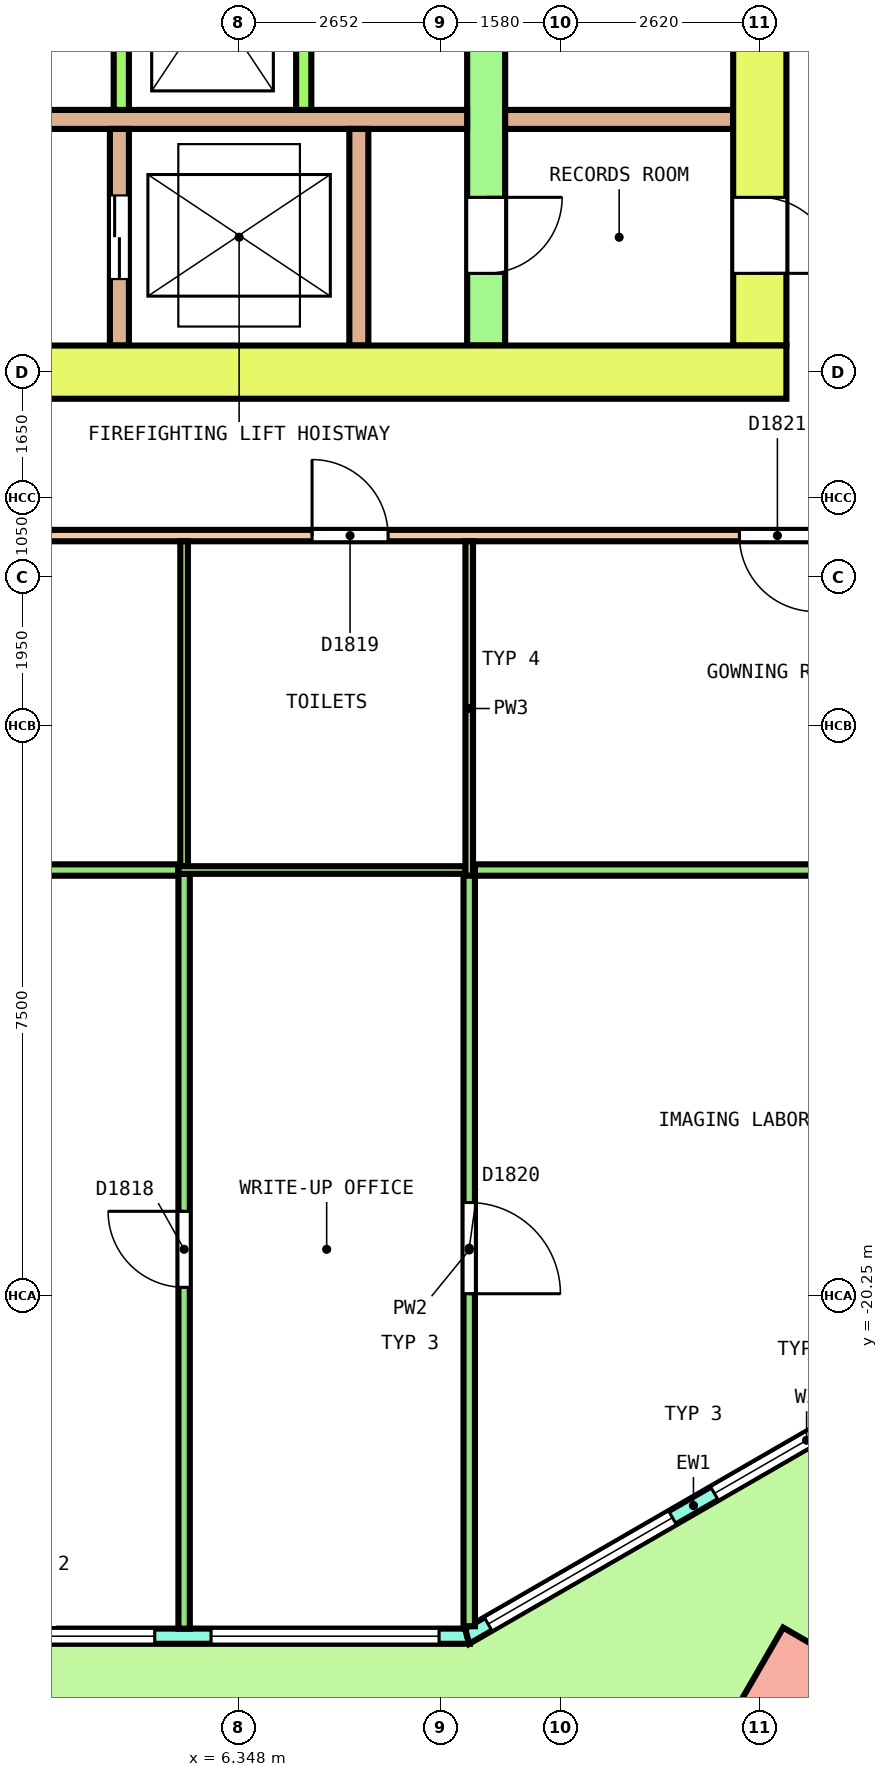
"""IFC4 building model, lengths in metres.
Left out: names, types, materials, properties, quantities, classifications, styles, units other than length and angle.
Written with IfcOpenShell. Run it as: python <this file> out.ifc"""

import sys

from ifc_helpers import new_model, si_unit, direction, frame, frame_2d, origin, origin_2d, place, context, subcontext, project, spatial, polyline, rectangle, outline, extrude, element, fill, save


model = new_model("IFC4")
c1 = context("Model", 3, precision=1e-05, world=origin(), true_north=direction((0.0, 1.0)))
c2 = subcontext(c1, "Body", "Model", "MODEL_VIEW")
j1 = project(units=[si_unit("LENGTHUNIT", "METRE"), si_unit("PLANEANGLEUNIT", "RADIAN")], contexts=[c1])
p1 = place(None, origin())
s1 = spatial("IfcSite", under=j1, at=p1, CompositionType="ELEMENT")
p2 = place(p1, origin())
s2 = spatial("IfcBuilding", under=s1, at=p2, CompositionType="ELEMENT")
p3 = place(p2, frame((0.0, 0.0, 171.6)))
s3 = spatial("IfcBuildingStorey", under=s2, at=p3, CompositionType="ELEMENT", Elevation=171.6)
p4 = place(p3, frame((13.727, -25.436, 0.0), z_axis=(-0.018133721723, -0.031387604711, 0.999342777233), x_axis=(0.86599921333, 0.499059227482, 0.031388691869)))
e1 = element("IfcColumn", 1, at=p4, inside=s3, PredefinedType="COLUMN", context=c2, shape_type="SweptSolid", body=[
    extrude(rectangle(XDim=1.2, YDim=1.2, at=origin_2d()), origin(), (0.0, 0.0, 1.0), 4.052),
])
p5 = place(p3, frame((-9.351, -24.73, 0.0), z_axis=(0.0, 0.0, 1.0), x_axis=(1.0, 0.0, 0.0)))
e2 = element("IfcWall", 2, at=p5, inside=s3, PredefinedType="SOLIDWALL", context=c2, shape_type="SweptSolid", body=[
    extrude(outline(polyline([(-0.027, -0.1), (1.015, -0.1), (2.057, -0.1), (3.099, -0.1), (4.141, -0.1), (5.183, -0.1), (6.225, -0.1), (7.267, -0.1), (8.309, -0.1), (9.351, -0.1), (10.393, -0.1), (11.435, -0.1), (12.476, -0.1), (13.518, -0.1), (14.56, -0.1), (15.602, -0.1), (16.644, -0.1), (17.686, -0.1), (18.728, -0.1), (18.674, 0.1), (17.638, 0.1), (16.602, 0.1), (15.566, 0.1), (14.531, 0.1), (13.494, 0.1), (12.458, 0.1), (11.423, 0.1), (10.386, 0.1), (9.351, 0.1), (8.315, 0.1), (7.279, 0.1), (6.243, 0.1), (5.207, 0.1), (4.171, 0.1), (3.135, 0.1), (2.099, 0.1), (1.063, 0.1), (0.027, 0.1), (-0.027, -0.1)])), origin(), (0.0, 0.0, 1.0), 4.1),
])
p6 = place(p5, frame((0.37, 0.0, 0.1)))
e3 = element("IfcOpeningElement", 3, at=p6, cuts=e2, PredefinedType="OPENING", context=c2, shape_type="SweptSolid", body=[
    extrude(rectangle(XDim=3.0, YDim=2.9, at=frame_2d((1.5, 1.45))), frame((0.0, 0.11, 0.0), z_axis=(0.0, -1.0, 0.0), x_axis=(1.0, 0.0, 0.0)), (0.0, 0.0, 1.0), 0.22),
])
p7 = place(p5, frame((4.11, 0.0, 0.1)))
e4 = element("IfcOpeningElement", 4, at=p7, cuts=e2, PredefinedType="OPENING", context=c2, shape_type="SweptSolid", body=[
    extrude(rectangle(XDim=3.0, YDim=2.9, at=frame_2d((1.5, 1.45))), frame((0.0, 0.11, 0.0), z_axis=(0.0, -1.0, 0.0), x_axis=(1.0, 0.0, 0.0)), (0.0, 0.0, 1.0), 0.22),
])
p8 = place(p5, frame((8.451, 0.0, 0.0)))
e5 = element("IfcOpeningElement", 5, at=p8, cuts=e2, PredefinedType="OPENING", context=c2, shape_type="SweptSolid", body=[
    extrude(rectangle(XDim=1.8, YDim=2.4, at=frame_2d((0.9, 1.2))), frame((0.0, 0.11, 0.0), z_axis=(0.0, -1.0, 0.0), x_axis=(1.0, 0.0, 0.0)), (0.0, 0.0, 1.0), 0.22),
])
p9 = place(p5, frame((8.451, 0.0, 2.55)))
e6 = element("IfcOpeningElement", 6, at=p9, cuts=e2, PredefinedType="OPENING", context=c2, shape_type="SweptSolid", body=[
    extrude(rectangle(XDim=1.8, YDim=0.45, at=frame_2d((0.9, 0.225))), frame((0.0, 0.11, 0.0), z_axis=(0.0, -1.0, 0.0), x_axis=(1.0, 0.0, 0.0)), (0.0, 0.0, 1.0), 0.22),
])
p10 = place(p5, frame((11.591, 0.0, 0.1)))
e7 = element("IfcOpeningElement", 7, at=p10, cuts=e2, PredefinedType="OPENING", context=c2, shape_type="SweptSolid", body=[
    extrude(rectangle(XDim=3.0, YDim=2.9, at=frame_2d((1.5, 1.45))), frame((0.0, 0.11, 0.0), z_axis=(0.0, -1.0, 0.0), x_axis=(1.0, 0.0, 0.0)), (0.0, 0.0, 1.0), 0.22),
])
p11 = place(p5, frame((15.331, 0.0, 0.1)))
e8 = element("IfcOpeningElement", 8, at=p11, cuts=e2, PredefinedType="OPENING", context=c2, shape_type="SweptSolid", body=[
    extrude(rectangle(XDim=3.0, YDim=2.9, at=frame_2d((1.5, 1.45))), frame((0.0, 0.11, 0.0), z_axis=(0.0, -1.0, 0.0), x_axis=(1.0, 0.0, 0.0)), (0.0, 0.0, 1.0), 0.22),
])
p12 = place(p3, frame((9.351, -24.73, 0.0), z_axis=(0.0, 0.0, 1.0), x_axis=(0.866014080581, 0.50001961185, 0.0)))
e9 = element("IfcWall", 9, at=p12, inside=s3, PredefinedType="SOLIDWALL", context=c2, shape_type="SweptSolid", body=[
    extrude(outline(polyline([(-0.027, -0.1), (1.128, -0.1), (2.283, -0.1), (3.438, -0.1), (4.592, -0.1), (5.747, -0.1), (6.902, -0.1), (6.848, 0.1), (5.711, 0.1), (4.574, 0.1), (3.438, 0.1), (2.301, 0.1), (1.164, 0.1), (0.027, 0.1), (-0.027, -0.1)])), origin(), (0.0, 0.0, 1.0), 4.1),
])
p13 = place(p12, frame((0.319, 0.0, 0.1)))
e10 = element("IfcOpeningElement", 10, at=p13, cuts=e9, PredefinedType="OPENING", context=c2, shape_type="SweptSolid", body=[
    extrude(rectangle(XDim=2.8, YDim=2.9, at=frame_2d((1.4, 1.45))), frame((0.0, 0.11, 0.0), z_axis=(0.0, -1.0, 0.0), x_axis=(1.0, 0.0, 0.0)), (0.0, 0.0, 1.0), 0.22),
])
p14 = place(p12, frame((3.756, 0.0, 0.1)))
e11 = element("IfcOpeningElement", 11, at=p14, cuts=e9, PredefinedType="OPENING", context=c2, shape_type="SweptSolid", body=[
    extrude(rectangle(XDim=2.8, YDim=2.9, at=frame_2d((1.4, 1.45))), frame((0.0, 0.11, 0.0), z_axis=(0.0, -1.0, 0.0), x_axis=(1.0, 0.0, 0.0)), (0.0, 0.0, 1.0), 0.22),
])
p15 = place(p3, frame((-13.55, -8.1, 0.0), z_axis=(0.0, 0.0, 1.0), x_axis=(1.0, 0.0, 0.0)))
e12 = element("IfcWall", 12, at=p15, inside=s3, PredefinedType="SHEAR", context=c2, shape_type="SweptSolid", body=[
    extrude(rectangle(XDim=27.1, YDim=0.7, at=frame_2d((13.55, 0.0))), origin(), (0.0, 0.0, 1.0), 4.1),
])
p16 = place(p15, frame((15.1, 0.0, 0.0)))
e13 = element("IfcOpeningElement", 13, at=p16, cuts=e12, PredefinedType="OPENING", context=c2, shape_type="SweptSolid", body=[
    extrude(rectangle(XDim=1.2, YDim=2.1, at=frame_2d((0.6, 1.05))), frame((0.0, 0.36, 0.0), z_axis=(0.0, -1.0, 0.0), x_axis=(1.0, 0.0, 0.0)), (0.0, 0.0, 1.0), 0.72),
])
p17 = place(p3, frame((13.2, -7.75, 0.0), z_axis=(0.0, 0.0, 1.0), x_axis=(0.0, 1.0, 0.0)))
e14 = element("IfcWall", 14, at=p17, inside=s3, PredefinedType="SHEAR", context=c2, shape_type="SweptSolid", body=[
    extrude(rectangle(XDim=15.5, YDim=0.7, at=frame_2d((7.75, 0.0))), origin(), (0.0, 0.0, 1.0), 4.1),
])
p18 = place(p17, frame((6.55, 0.0, 0.0)))
e15 = element("IfcOpeningElement", 15, at=p18, cuts=e14, PredefinedType="OPENING", context=c2, shape_type="SweptSolid", body=[
    extrude(rectangle(XDim=2.4, YDim=2.1, at=frame_2d((1.2, 1.05))), frame((0.0, 0.36, 0.0), z_axis=(0.0, -1.0, 0.0), x_axis=(1.0, 0.0, 0.0)), (0.0, 0.0, 1.0), 0.72),
])
p19 = place(p17, frame((13.45, 0.0, 0.0)))
e16 = element("IfcOpeningElement", 16, at=p19, cuts=e14, PredefinedType="OPENING", context=c2, shape_type="SweptSolid", body=[
    extrude(rectangle(XDim=1.2, YDim=2.1, at=frame_2d((0.6, 1.05))), frame((0.0, 0.36, 0.0), z_axis=(0.0, -1.0, 0.0), x_axis=(1.0, 0.0, 0.0)), (0.0, 0.0, 1.0), 0.72),
])
p20 = place(p17, frame((0.95, 0.0, 0.0)))
e17 = element("IfcOpeningElement", 17, at=p20, cuts=e14, PredefinedType="OPENING", context=c2, shape_type="SweptSolid", body=[
    extrude(rectangle(XDim=1.0, YDim=2.1, at=frame_2d((0.5, 1.05))), frame((0.0, 0.36, 0.0), z_axis=(0.0, -1.0, 0.0), x_axis=(1.0, 0.0, 0.0)), (0.0, 0.0, 1.0), 0.72),
])
p21 = place(p3, frame((9.6, -7.75, 0.0), z_axis=(0.0, 0.0, 1.0), x_axis=(0.0, 1.0, 0.0)))
e18 = element("IfcWall", 18, at=p21, inside=s3, PredefinedType="SHEAR", context=c2, shape_type="SweptSolid", body=[
    extrude(rectangle(XDim=15.5, YDim=0.5, at=frame_2d((7.75, 0.0))), origin(), (0.0, 0.0, 1.0), 4.1),
])
p22 = place(p21, frame((6.55, 0.0, 0.0)))
e19 = element("IfcOpeningElement", 19, at=p22, cuts=e18, PredefinedType="OPENING", context=c2, shape_type="SweptSolid", body=[
    extrude(rectangle(XDim=2.4, YDim=2.1, at=frame_2d((1.2, 1.05))), frame((0.0, 0.26, 0.0), z_axis=(0.0, -1.0, 0.0), x_axis=(1.0, 0.0, 0.0)), (0.0, 0.0, 1.0), 0.52),
])
p23 = place(p21, frame((13.45, 0.0, 0.0)))
e20 = element("IfcOpeningElement", 20, at=p23, cuts=e18, PredefinedType="OPENING", context=c2, shape_type="SweptSolid", body=[
    extrude(rectangle(XDim=1.2, YDim=2.1, at=frame_2d((0.6, 1.05))), frame((0.0, 0.26, 0.0), z_axis=(0.0, -1.0, 0.0), x_axis=(1.0, 0.0, 0.0)), (0.0, 0.0, 1.0), 0.52),
])
p24 = place(p21, frame((0.95, 0.0, 0.0)))
e21 = element("IfcOpeningElement", 21, at=p24, cuts=e18, PredefinedType="OPENING", context=c2, shape_type="SweptSolid", body=[
    extrude(rectangle(XDim=1.0, YDim=2.1, at=frame_2d((0.5, 1.05))), frame((0.0, 0.26, 0.0), z_axis=(0.0, -1.0, 0.0), x_axis=(1.0, 0.0, 0.0)), (0.0, 0.0, 1.0), 0.52),
])
p25 = place(p3, frame((-9.35, -4.775, 0.0), z_axis=(0.0, 0.0, 1.0), x_axis=(1.0, 0.0, 0.0)))
e22 = element("IfcWall", 22, at=p25, inside=s3, PredefinedType="SOLIDWALL", context=c2, shape_type="SweptSolid", body=[
    extrude(rectangle(XDim=18.7, YDim=0.25, at=frame_2d((9.35, 0.0))), origin(), (0.0, 0.0, 1.0), 4.1),
])
p26 = place(p3, frame((9.85, -4.775, 0.0), z_axis=(0.0, 0.0, 1.0), x_axis=(1.0, 0.0, 0.0)))
e23 = element("IfcWall", 23, at=p26, inside=s3, PredefinedType="SOLIDWALL", context=c2, shape_type="SweptSolid", body=[
    extrude(rectangle(XDim=3.0, YDim=0.25, at=frame_2d((1.5, 0.0))), origin(), (0.0, 0.0, 1.0), 4.1),
])
for number, where, z_axis, x_axis in (
    (24, (4.8, -4.65, 0.0), (0.0, 0.0, 1.0), (0.0, 1.0, 0.0)),
    (25, (7.2, -4.65, 0.0), (0.0, 0.0, 1.0), (0.0, 1.0, 0.0)),
):
    element("IfcWall", number, at=place(p3, frame(where, z_axis=z_axis, x_axis=x_axis)), inside=s3, PredefinedType="SOLIDWALL", context=c2, shape_type="SweptSolid", body=[
        extrude(rectangle(XDim=2.9, YDim=0.2, at=frame_2d((1.45, 0.0))), origin(), (0.0, 0.0, 1.0), 4.1),
    ])
p27 = place(p3, frame((4.775, -7.75, 0.0), z_axis=(0.0, 0.0, 1.0), x_axis=(0.0, 1.0, 0.0)))
e26 = element("IfcWall", 26, at=p27, inside=s3, PredefinedType="SOLIDWALL", context=c2, shape_type="SweptSolid", body=[
    extrude(rectangle(XDim=2.85, YDim=0.25, at=frame_2d((1.425, 0.0))), origin(), (0.0, 0.0, 1.0), 4.1),
])
p28 = place(p27, frame((0.875, 0.0, 0.0)))
e27 = element("IfcOpeningElement", 27, at=p28, cuts=e26, PredefinedType="OPENING", context=c2, shape_type="SweptSolid", body=[
    extrude(rectangle(XDim=1.1, YDim=2.1, at=frame_2d((0.55, 1.05))), frame((0.0, 0.135, 0.0), z_axis=(0.0, -1.0, 0.0), x_axis=(1.0, 0.0, 0.0)), (0.0, 0.0, 1.0), 0.27),
])
p29 = place(p3, frame((7.925, -7.75, 0.0), z_axis=(0.0, 0.0, 1.0), x_axis=(0.0, 1.0, 0.0)))
e28 = element("IfcWall", 28, at=p29, inside=s3, PredefinedType="SOLIDWALL", context=c2, shape_type="SweptSolid", body=[
    extrude(rectangle(XDim=2.85, YDim=0.25, at=frame_2d((1.425, 0.0))), origin(), (0.0, 0.0, 1.0), 4.1),
])
p30 = place(p3, frame((-15.275, -10.25, 0.0), z_axis=(0.0, 0.0, 1.0), x_axis=(1.0, 0.0, 0.0)))
e29 = element("IfcWall", 29, at=p30, inside=s3, PredefinedType="PARTITIONING", context=c2, shape_type="SweptSolid", body=[
    extrude(rectangle(XDim=30.575, YDim=0.15, at=frame_2d((15.288, 0.0))), origin(), (0.0, 0.0, 1.0), 3.05),
])
p31 = place(p30, frame((1.102, 0.0, 0.0)))
e30 = element("IfcOpeningElement", 30, at=p31, cuts=e29, PredefinedType="OPENING", context=c2, shape_type="SweptSolid", body=[
    extrude(rectangle(XDim=1.0, YDim=2.1, at=frame_2d((0.5, 1.05))), frame((0.0, 0.085, 0.0), z_axis=(0.0, -1.0, 0.0), x_axis=(1.0, 0.0, 0.0)), (0.0, 0.0, 1.0), 0.17),
])
p32 = place(p30, frame((13.715, 0.0, 0.0)))
e31 = element("IfcOpeningElement", 31, at=p32, cuts=e29, PredefinedType="OPENING", context=c2, shape_type="SweptSolid", body=[
    extrude(rectangle(XDim=1.2, YDim=2.1, at=frame_2d((0.6, 1.05))), frame((0.0, 0.085, 0.0), z_axis=(0.0, -1.0, 0.0), x_axis=(1.0, 0.0, 0.0)), (0.0, 0.0, 1.0), 0.17),
])
p33 = place(p30, frame((22.585, 0.0, 0.0)))
e32 = element("IfcOpeningElement", 32, at=p33, cuts=e29, PredefinedType="OPENING", context=c2, shape_type="SweptSolid", body=[
    extrude(rectangle(XDim=1.0, YDim=2.1, at=frame_2d((0.5, 1.05))), frame((0.0, 0.085, 0.0), z_axis=(0.0, -1.0, 0.0), x_axis=(1.0, 0.0, 0.0)), (0.0, 0.0, 1.0), 0.17),
])
p34 = place(p30, frame((28.207, 0.0, 0.0)))
e33 = element("IfcOpeningElement", 33, at=p34, cuts=e29, PredefinedType="OPENING", context=c2, shape_type="SweptSolid", body=[
    extrude(rectangle(XDim=1.0, YDim=2.1, at=frame_2d((0.5, 1.05))), frame((0.0, 0.085, 0.0), z_axis=(0.0, -1.0, 0.0), x_axis=(1.0, 0.0, 0.0)), (0.0, 0.0, 1.0), 0.17),
])
p35 = place(p3, frame((-19.024, -14.65, 0.0), z_axis=(0.0, 0.0, 1.0), x_axis=(1.0, 0.0, 0.0)))
e34 = element("IfcWall", 34, at=p35, inside=s3, PredefinedType="PARTITIONING", context=c2, shape_type="SweptSolid", body=[
    extrude(rectangle(XDim=24.575, YDim=0.15, at=frame_2d((12.288, 0.0))), origin(), (0.0, 0.0, 1.0), 3.05),
])
p36 = place(p35, frame((2.823, 0.0, 0.0)))
e35 = element("IfcOpeningElement", 35, at=p36, cuts=e34, PredefinedType="OPENING", context=c2, shape_type="SweptSolid", body=[
    extrude(rectangle(XDim=1.0, YDim=2.1, at=frame_2d((0.5, 1.05))), frame((0.0, 0.085, 0.0), z_axis=(0.0, -1.0, 0.0), x_axis=(1.0, 0.0, 0.0)), (0.0, 0.0, 1.0), 0.17),
])
p37 = place(p35, frame((11.022, 0.0, 0.0)))
e36 = element("IfcOpeningElement", 36, at=p37, cuts=e34, PredefinedType="OPENING", context=c2, shape_type="SweptSolid", body=[
    extrude(rectangle(XDim=1.2, YDim=2.1, at=frame_2d((0.6, 1.05))), frame((0.0, 0.085, 0.0), z_axis=(0.0, -1.0, 0.0), x_axis=(1.0, 0.0, 0.0)), (0.0, 0.0, 1.0), 0.17),
])
p38 = place(p3, frame((9.452, -14.65, 0.0), z_axis=(0.0, 0.0, 1.0), x_axis=(1.0, 0.0, 0.0)))
e37 = element("IfcWall", 37, at=p38, inside=s3, PredefinedType="PARTITIONING", context=c2, shape_type="SweptSolid", body=[
    extrude(rectangle(XDim=9.571, YDim=0.15, at=frame_2d((4.786, 0.0))), origin(), (0.0, 0.0, 1.0), 3.05),
])
p39 = place(p3, frame((5.626, -24.63, 0.0), z_axis=(0.0, 0.0, 1.0), x_axis=(0.0, 1.0, 0.0)))
e38 = element("IfcWall", 38, at=p39, inside=s3, PredefinedType="PARTITIONING", context=c2, shape_type="SweptSolid", body=[
    extrude(rectangle(XDim=9.93, YDim=0.15, at=frame_2d((4.965, 0.0))), origin(), (0.0, 0.0, 1.0), 3.05),
])
p40 = place(p39, frame((4.49, 0.0, 0.0)))
e39 = element("IfcOpeningElement", 39, at=p40, cuts=e38, PredefinedType="OPENING", context=c2, shape_type="SweptSolid", body=[
    extrude(rectangle(XDim=1.0, YDim=2.1, at=frame_2d((0.5, 1.05))), frame((0.0, 0.085, 0.0), z_axis=(0.0, -1.0, 0.0), x_axis=(1.0, 0.0, 0.0)), (0.0, 0.0, 1.0), 0.17),
])
p41 = place(p3, frame((9.377, -24.599, 0.0), z_axis=(0.0, 0.0, 1.0), x_axis=(0.0, 1.0, 0.0)))
e40 = element("IfcWall", 40, at=p41, inside=s3, PredefinedType="PARTITIONING", context=c2, shape_type="SweptSolid", body=[
    extrude(rectangle(XDim=9.899, YDim=0.15, at=frame_2d((4.949, 0.0))), origin(), (0.0, 0.0, 1.0), 3.05),
])
p42 = place(p41, frame((4.375, 0.0, 0.0)))
e41 = element("IfcOpeningElement", 41, at=p42, cuts=e40, PredefinedType="OPENING", context=c2, shape_type="SweptSolid", body=[
    extrude(rectangle(XDim=1.2, YDim=2.1, at=frame_2d((0.6, 1.05))), frame((0.0, 0.085, 0.0), z_axis=(0.0, -1.0, 0.0), x_axis=(1.0, 0.0, 0.0)), (0.0, 0.0, 1.0), 0.17),
])
p43 = place(p3, frame((5.626, -14.6, 0.0), z_axis=(0.0, 0.0, 1.0), x_axis=(0.0, 1.0, 0.0)))
e42 = element("IfcWall", 42, at=p43, inside=s3, PredefinedType="PARTITIONING", context=c2, shape_type="SweptSolid", body=[
    extrude(rectangle(XDim=4.275, YDim=0.1, at=frame_2d((2.138, 0.0))), origin(), (0.0, 0.0, 1.0), 3.05),
])
p44 = place(p3, frame((5.552, -14.65, 0.0), z_axis=(0.0, 0.0, 1.0), x_axis=(1.0, 0.0, 0.0)))
e43 = element("IfcWall", 43, at=p44, inside=s3, PredefinedType="PARTITIONING", context=c2, shape_type="SweptSolid", body=[
    extrude(rectangle(XDim=3.776, YDim=0.1, at=frame_2d((1.888, 0.0))), origin(), (0.0, 0.0, 1.0), 3.05),
])
p45 = place(p3, frame((9.377, -14.725, 0.0), z_axis=(0.0, 0.0, 1.0), x_axis=(0.0, 1.0, 0.0)))
e44 = element("IfcWall", 44, at=p45, inside=s3, PredefinedType="PARTITIONING", context=c2, shape_type="SweptSolid", body=[
    extrude(rectangle(XDim=4.4, YDim=0.1, at=frame_2d((2.2, 0.0))), origin(), (0.0, 0.0, 1.0), 3.05),
])
p46 = place(p10, origin())
e45 = element("IfcWindow", 45, at=p46, inside=s3, PartitioningType="SINGLE_PANEL", PredefinedType="WINDOW", context=c2, shape_type="SweptSolid", body=[
    extrude(rectangle(XDim=3.0, YDim=2.9, at=frame_2d((1.5, 1.45))), frame((0.0, 0.03, 0.0), z_axis=(0.0, -1.0, 0.0), x_axis=(1.0, 0.0, 0.0)), (0.0, 0.0, 1.0), 0.06),
])
fill(e7, e45)
p47 = place(p11, origin())
e46 = element("IfcWindow", 46, at=p47, inside=s3, PartitioningType="SINGLE_PANEL", PredefinedType="WINDOW", context=c2, shape_type="SweptSolid", body=[
    extrude(rectangle(XDim=3.0, YDim=2.9, at=frame_2d((1.5, 1.45))), frame((0.0, 0.03, 0.0), z_axis=(0.0, -1.0, 0.0), x_axis=(1.0, 0.0, 0.0)), (0.0, 0.0, 1.0), 0.06),
])
fill(e8, e46)
p48 = place(p13, origin())
e47 = element("IfcWindow", 47, at=p48, inside=s3, PartitioningType="SINGLE_PANEL", PredefinedType="WINDOW", context=c2, shape_type="SweptSolid", body=[
    extrude(rectangle(XDim=2.8, YDim=2.9, at=frame_2d((1.4, 1.45))), frame((0.0, 0.03, 0.0), z_axis=(0.0, -1.0, 0.0), x_axis=(1.0, 0.0, 0.0)), (0.0, 0.0, 1.0), 0.06),
])
fill(e10, e47)
p49 = place(p14, origin())
e48 = element("IfcWindow", 48, at=p49, inside=s3, PartitioningType="SINGLE_PANEL", PredefinedType="WINDOW", context=c2, shape_type="SweptSolid", body=[
    extrude(rectangle(XDim=2.8, YDim=2.9, at=frame_2d((1.4, 1.45))), frame((0.0, 0.03, 0.0), z_axis=(0.0, -1.0, 0.0), x_axis=(1.0, 0.0, 0.0)), (0.0, 0.0, 1.0), 0.06),
])
fill(e11, e48)
p50 = place(p28, origin())
e49 = element("IfcDoor", 49, at=p50, inside=s3, OperationType="DOUBLE_DOOR_SLIDING", PredefinedType="DOOR", context=c2, shape_type="SweptSolid", body=[
    extrude(rectangle(XDim=1.1, YDim=2.1, at=frame_2d((0.55, 1.05))), frame((0.0, 0.075, 0.0), z_axis=(0.0, -1.0, 0.0), x_axis=(1.0, 0.0, 0.0)), (0.0, 0.0, 1.0), 0.15),
])
fill(e27, e49)
p51 = place(p24, origin())
e50 = element("IfcDoor", 50, at=p51, inside=s3, OperationType="SINGLE_SWING_LEFT", PredefinedType="DOOR", context=c2, shape_type="SweptSolid", body=[
    extrude(rectangle(XDim=1.0, YDim=2.1, at=frame_2d((0.5, 1.05))), frame((0.0, 0.2, 0.0), z_axis=(0.0, -1.0, 0.0), x_axis=(1.0, 0.0, 0.0)), (0.0, 0.0, 1.0), 0.4),
])
fill(e21, e50)
p52 = place(p20, origin())
e51 = element("IfcDoor", 51, at=p52, inside=s3, OperationType="SINGLE_SWING_RIGHT", PredefinedType="DOOR", context=c2, shape_type="SweptSolid", body=[
    extrude(rectangle(XDim=1.0, YDim=2.1, at=frame_2d((0.5, 1.05))), frame((0.0, 0.3, 0.0), z_axis=(0.0, -1.0, 0.0), x_axis=(1.0, 0.0, 0.0)), (0.0, 0.0, 1.0), 0.6),
])
fill(e17, e51)
p53 = place(p40, origin())
e52 = element("IfcDoor", 52, at=p53, inside=s3, OperationType="SINGLE_SWING_RIGHT", PredefinedType="DOOR", context=c2, shape_type="SweptSolid", body=[
    extrude(rectangle(XDim=1.0, YDim=2.1, at=frame_2d((0.5, 1.05))), frame((0.0, 0.025, 0.0), z_axis=(0.0, -1.0, 0.0), x_axis=(1.0, 0.0, 0.0)), (0.0, 0.0, 1.0), 0.05),
])
fill(e39, e52)
p54 = place(p33, origin())
e53 = element("IfcDoor", 53, at=p54, inside=s3, OperationType="SINGLE_SWING_LEFT", PredefinedType="DOOR", context=c2, shape_type="SweptSolid", body=[
    extrude(rectangle(XDim=1.0, YDim=2.1, at=frame_2d((0.5, 1.05))), frame((0.0, 0.025, 0.0), z_axis=(0.0, -1.0, 0.0), x_axis=(1.0, 0.0, 0.0)), (0.0, 0.0, 1.0), 0.05),
])
fill(e32, e53)
p55 = place(p42, origin())
e54 = element("IfcDoor", 54, at=p55, inside=s3, OperationType="DOUBLE_DOOR_SINGLE_SWING", PredefinedType="DOOR", context=c2, shape_type="SweptSolid", body=[
    extrude(rectangle(XDim=1.2, YDim=2.1, at=frame_2d((0.6, 1.05))), frame((0.0, 0.025, 0.0), z_axis=(0.0, -1.0, 0.0), x_axis=(1.0, 0.0, 0.0)), (0.0, 0.0, 1.0), 0.05),
])
fill(e41, e54)
p56 = place(p34, origin())
e55 = element("IfcDoor", 55, at=p56, inside=s3, OperationType="SINGLE_SWING_RIGHT", PredefinedType="DOOR", context=c2, shape_type="SweptSolid", body=[
    extrude(rectangle(XDim=1.0, YDim=2.1, at=frame_2d((0.5, 1.05))), frame((0.0, 0.025, 0.0), z_axis=(0.0, -1.0, 0.0), x_axis=(1.0, 0.0, 0.0)), (0.0, 0.0, 1.0), 0.05),
])
fill(e33, e55)
save(model, sys.argv[1])
